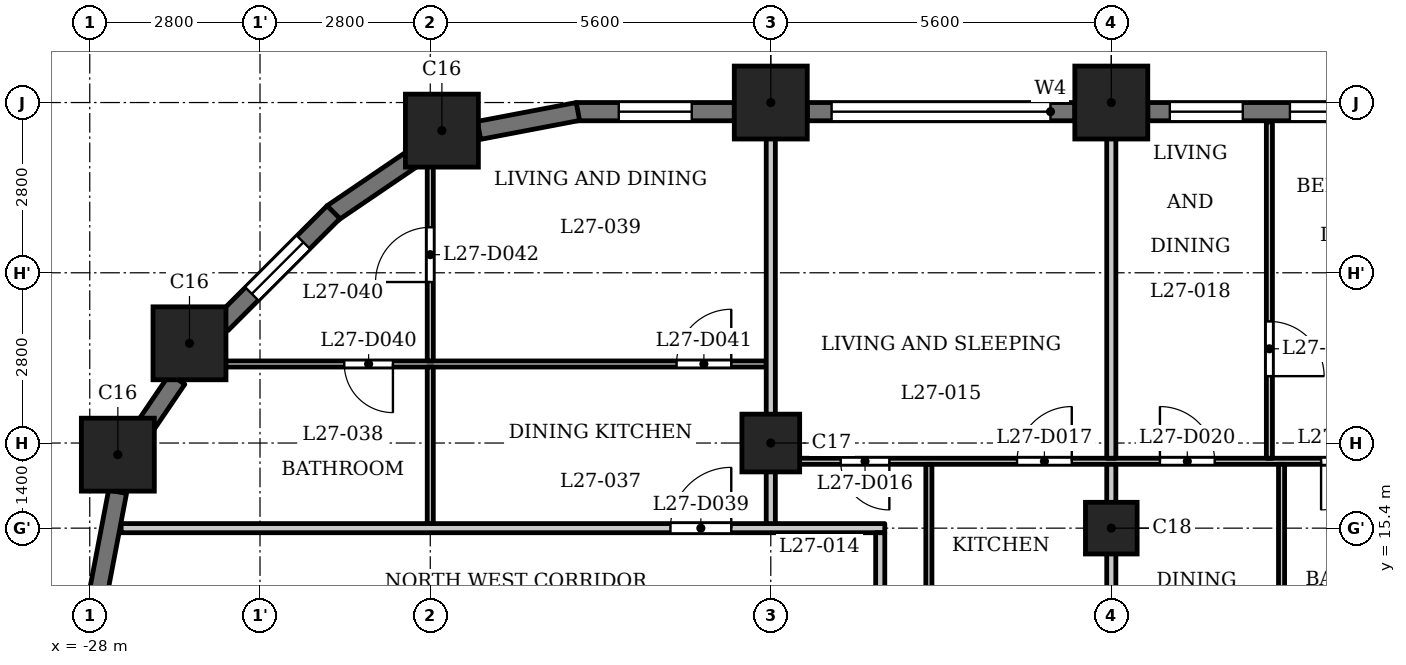
"""IFC4 building model, lengths in metres.
Left out: names, types, materials, properties, quantities, classifications, styles, units other than length and angle.
Written with IfcOpenShell. Run it as: python <this file> out.ifc"""

import sys

from ifc_helpers import new_model, si_unit, direction, frame, frame_2d, origin, origin_2d, place, context, subcontext, project, spatial, rectangle, extrude, element, fill, save


model = new_model("IFC4")
c1 = context("Model", 3, precision=1e-05, world=origin(), true_north=direction((0.0, 1.0)))
c2 = subcontext(c1, "Body", "Model", "MODEL_VIEW")
j1 = project(units=[si_unit("LENGTHUNIT", "METRE"), si_unit("PLANEANGLEUNIT", "RADIAN")], contexts=[c1])
p1 = place(None, origin())
s1 = spatial("IfcSite", under=j1, at=p1, CompositionType="ELEMENT")
p2 = place(p1, origin())
s2 = spatial("IfcBuilding", under=s1, at=p2, CompositionType="ELEMENT")
p3 = place(p2, frame((0.0, 0.0, 107.8)))
s3 = spatial("IfcBuildingStorey", under=s2, at=p3, CompositionType="ELEMENT", Elevation=107.8)
for number, where, z_axis, x_axis in (
    (1, (-11.2, 22.4, 0.0), (0.0, 0.0, 1.0), (1.0, 0.0, 0.0)),
    (2, (-16.8, 22.4, 0.0), (0.0, 0.0, 1.0), (1.0, 0.0, 0.0)),
    (3, (-22.209, 21.938, 0.0), (0.0, 0.0, 1.0), (1.0, 0.0, 0.0)),
    (4, (-26.36, 18.44, 0.0), (0.0, 0.0, 1.0), (1.0, 0.0, 0.0)),
    (5, (-27.538, 16.609, 0.0), (0.0, 0.0, 1.0), (1.0, 0.0, 0.0)),
):
    element("IfcColumn", number, at=place(p3, frame(where, z_axis=z_axis, x_axis=x_axis)), inside=s3, PredefinedType="COLUMN", context=c2, shape_type="SweptSolid", body=[
        extrude(rectangle(XDim=1.2, YDim=1.2, at=origin_2d()), origin(), (0.0, 0.0, 1.0), 3.5),
    ])
p4 = place(p3, frame((-16.8, 16.8, 0.0), z_axis=(0.0, 0.0, 1.0), x_axis=(1.0, 0.0, 0.0)))
e6 = element("IfcColumn", 6, at=p4, inside=s3, PredefinedType="COLUMN", context=c2, shape_type="SweptSolid", body=[
    extrude(rectangle(XDim=0.95, YDim=0.95, at=origin_2d()), origin(), (0.0, 0.0, 1.0), 3.5),
])
p5 = place(p3, frame((-11.2, 15.4, 0.0), z_axis=(0.0, 0.0, 1.0), x_axis=(1.0, 0.0, 0.0)))
e7 = element("IfcColumn", 7, at=p5, inside=s3, PredefinedType="COLUMN", context=c2, shape_type="SweptSolid", body=[
    extrude(rectangle(XDim=0.85, YDim=0.85, at=origin_2d()), origin(), (0.0, 0.0, 1.0), 3.5),
])
p6 = place(p3, frame((-6.2, 22.25, 0.0), z_axis=(0.0, 0.0, 1.0), x_axis=(-1.0, 0.0, 0.0)))
e8 = element("IfcWall", 8, at=p6, inside=s3, PredefinedType="SOLIDWALL", context=c2, shape_type="SweptSolid", body=[
    extrude(rectangle(XDim=4.4, YDim=0.3, at=frame_2d((2.2, 0.0))), origin(), (0.0, 0.0, 1.0), 2.4),
])
p7 = place(p6, frame((0.262, 0.0, 0.9)))
e9 = element("IfcOpeningElement", 9, at=p7, cuts=e8, PredefinedType="OPENING", context=c2, shape_type="SweptSolid", body=[
    extrude(rectangle(XDim=1.8, YDim=1.25, at=frame_2d((0.9, 0.625))), frame((0.0, 0.16, 0.0), z_axis=(0.0, -1.0, 0.0), x_axis=(1.0, 0.0, 0.0)), (0.0, 0.0, 1.0), 0.32),
])
p8 = place(p6, frame((2.837, 0.0, 0.6)))
e10 = element("IfcOpeningElement", 10, at=p8, cuts=e8, PredefinedType="OPENING", context=c2, shape_type="SweptSolid", body=[
    extrude(rectangle(XDim=1.2, YDim=1.55, at=frame_2d((0.6, 0.775))), frame((0.0, 0.16, 0.0), z_axis=(0.0, -1.0, 0.0), x_axis=(1.0, 0.0, 0.0)), (0.0, 0.0, 1.0), 0.32),
])
p9 = place(p3, frame((-11.8, 22.25, 0.0), z_axis=(0.0, 0.0, 1.0), x_axis=(-1.0, 0.0, 0.0)))
e11 = element("IfcWall", 11, at=p9, inside=s3, PredefinedType="SOLIDWALL", context=c2, shape_type="SweptSolid", body=[
    extrude(rectangle(XDim=4.4, YDim=0.3, at=frame_2d((2.2, 0.0))), origin(), (0.0, 0.0, 1.0), 2.4),
])
p10 = place(p9, frame((0.4, 0.0, 1.2)))
e12 = element("IfcOpeningElement", 12, at=p10, cuts=e11, PredefinedType="OPENING", context=c2, shape_type="SweptSolid", body=[
    extrude(rectangle(XDim=3.6, YDim=0.95, at=frame_2d((1.8, 0.475))), frame((0.0, 0.16, 0.0), z_axis=(0.0, -1.0, 0.0), x_axis=(1.0, 0.0, 0.0)), (0.0, 0.0, 1.0), 0.32),
])
p11 = place(p3, frame((-17.4, 22.25, 0.0), z_axis=(0.0, 0.0, 1.0), x_axis=(-1.0, 0.0, 0.0)))
e13 = element("IfcWall", 13, at=p11, inside=s3, PredefinedType="SOLIDWALL", context=c2, shape_type="SweptSolid", body=[
    extrude(rectangle(XDim=2.6, YDim=0.3, at=frame_2d((1.3, 0.0))), origin(), (0.0, 0.0, 1.0), 2.4),
])
p12 = place(p11, frame((0.7, 0.0, 0.6)))
e14 = element("IfcOpeningElement", 14, at=p12, cuts=e13, PredefinedType="OPENING", context=c2, shape_type="SweptSolid", body=[
    extrude(rectangle(XDim=1.2, YDim=1.55, at=frame_2d((0.6, 0.775))), frame((0.0, 0.16, 0.0), z_axis=(0.0, -1.0, 0.0), x_axis=(1.0, 0.0, 0.0)), (0.0, 0.0, 1.0), 0.32),
])
for number, where, z_axis, x_axis in (
    (15, (-19.972, 22.253, 0.0), (0.0, 0.0, 1.0), (-0.982, -0.187, 0.0)),
    (16, (-22.643, 21.51, 0.0), (0.0, 0.0, 1.0), (-0.827, -0.562, 0.0)),
):
    element("IfcWall", number, at=place(p3, frame(where, z_axis=z_axis, x_axis=x_axis)), inside=s3, PredefinedType="SOLIDWALL", context=c2, shape_type="SweptSolid", body=[
        extrude(rectangle(XDim=1.656, YDim=0.3, at=frame_2d((0.828, 0.0))), origin(), (0.0, 0.0, 1.0), 2.4),
    ])
p13 = place(p3, frame((-23.991, 20.597, 0.0), z_axis=(0.0, 0.0, 1.0), x_axis=(-0.707106781187, -0.707106781187, 0.0)))
e17 = element("IfcWall", 17, at=p13, inside=s3, PredefinedType="SOLIDWALL", context=c2, shape_type="SweptSolid", body=[
    extrude(rectangle(XDim=2.6, YDim=0.3, at=frame_2d((1.3, 0.0))), origin(), (0.0, 0.0, 1.0), 2.4),
])
p14 = place(p13, frame((0.7, 0.0, 0.6)))
e18 = element("IfcOpeningElement", 18, at=p14, cuts=e17, PredefinedType="OPENING", context=c2, shape_type="SweptSolid", body=[
    extrude(rectangle(XDim=1.2, YDim=1.55, at=frame_2d((0.6, 0.775))), frame((0.0, 0.16, 0.0), z_axis=(0.0, -1.0, 0.0), x_axis=(1.0, 0.0, 0.0)), (0.0, 0.0, 1.0), 0.32),
])
p15 = place(p3, frame((-26.561, 17.851, 0.0), z_axis=(0.0, 0.0, 1.0), x_axis=(-0.562173331661, -0.827019434577, 0.0)))
e19 = element("IfcWall", 19, at=p15, inside=s3, PredefinedType="SOLIDWALL", context=c2, shape_type="SweptSolid", body=[
    extrude(rectangle(XDim=0.977, YDim=0.3, at=frame_2d((0.489, 0.0))), origin(), (0.0, 0.0, 1.0), 3.2),
])
p16 = place(p3, frame((-27.542, 15.999, 0.0), z_axis=(0.0, 0.0, 1.0), x_axis=(-0.187349172861, -0.982293381546, 0.0)))
e20 = element("IfcWall", 20, at=p16, inside=s3, PredefinedType="SOLIDWALL", context=c2, shape_type="SweptSolid", body=[
    extrude(rectangle(XDim=1.656, YDim=0.3, at=frame_2d((0.828, 0.0))), origin(), (0.0, 0.0, 1.0), 2.4),
])
p17 = place(p3, frame((-27.484, 15.4, 0.0), z_axis=(0.0, 0.0, 1.0), x_axis=(1.0, 0.0, 0.0)))
e21 = element("IfcWall", 21, at=p17, inside=s3, PredefinedType="PARTITIONING", context=c2, shape_type="SweptSolid", body=[
    extrude(rectangle(XDim=12.559, YDim=0.15, at=frame_2d((6.279, 0.0))), origin(), (0.0, 0.0, 1.0), 3.2),
])
p18 = place(p17, frame((9.034, 0.0, 0.0)))
e22 = element("IfcOpeningElement", 22, at=p18, cuts=e21, PredefinedType="OPENING", context=c2, shape_type="SweptSolid", body=[
    extrude(rectangle(XDim=1.0, YDim=2.1, at=frame_2d((0.5, 1.05))), frame((0.0, 0.085, 0.0), z_axis=(0.0, -1.0, 0.0), x_axis=(1.0, 0.0, 0.0)), (0.0, 0.0, 1.0), 0.17),
])
p19 = place(p3, frame((-16.725, 16.5, 0.0), z_axis=(0.0, 0.0, 1.0), x_axis=(1.0, 0.0, 0.0)))
e23 = element("IfcWall", 23, at=p19, inside=s3, PredefinedType="PARTITIONING", context=c2, shape_type="SweptSolid", body=[
    extrude(rectangle(XDim=33.45, YDim=0.1, at=frame_2d((16.725, 0.0))), origin(), (0.0, 0.0, 1.0), 3.2),
])
p20 = place(p19, frame((1.075, 0.0, 0.0)))
e24 = element("IfcOpeningElement", 24, at=p20, cuts=e23, PredefinedType="OPENING", context=c2, shape_type="SweptSolid", body=[
    extrude(rectangle(XDim=0.8, YDim=2.1, at=frame_2d((0.4, 1.05))), frame((0.0, 0.06, 0.0), z_axis=(0.0, -1.0, 0.0), x_axis=(1.0, 0.0, 0.0)), (0.0, 0.0, 1.0), 0.12),
])
p21 = place(p19, frame((3.975, 0.0, 0.0)))
e25 = element("IfcOpeningElement", 25, at=p21, cuts=e23, PredefinedType="OPENING", context=c2, shape_type="SweptSolid", body=[
    extrude(rectangle(XDim=0.9, YDim=2.1, at=frame_2d((0.45, 1.05))), frame((0.0, 0.06, 0.0), z_axis=(0.0, -1.0, 0.0), x_axis=(1.0, 0.0, 0.0)), (0.0, 0.0, 1.0), 0.12),
])
p22 = place(p19, frame((8.975, 0.0, 0.0)))
e26 = element("IfcOpeningElement", 26, at=p22, cuts=e23, PredefinedType="OPENING", context=c2, shape_type="SweptSolid", body=[
    extrude(rectangle(XDim=0.8, YDim=2.1, at=frame_2d((0.4, 1.05))), frame((0.0, 0.06, 0.0), z_axis=(0.0, -1.0, 0.0), x_axis=(1.0, 0.0, 0.0)), (0.0, 0.0, 1.0), 0.12),
])
p23 = place(p19, frame((6.325, 0.0, 0.0)))
e27 = element("IfcOpeningElement", 27, at=p23, cuts=e23, PredefinedType="OPENING", context=c2, shape_type="SweptSolid", body=[
    extrude(rectangle(XDim=0.9, YDim=2.1, at=frame_2d((0.45, 1.05))), frame((0.0, 0.06, 0.0), z_axis=(0.0, -1.0, 0.0), x_axis=(1.0, 0.0, 0.0)), (0.0, 0.0, 1.0), 0.12),
])
p24 = place(p19, frame((20.725, 0.0, 0.0)))
e28 = element("IfcOpeningElement", 28, at=p24, cuts=e23, PredefinedType="OPENING", context=c2, shape_type="SweptSolid", body=[
    extrude(rectangle(XDim=0.8, YDim=2.1, at=frame_2d((0.4, 1.05))), frame((0.0, 0.06, 0.0), z_axis=(0.0, -1.0, 0.0), x_axis=(1.0, 0.0, 0.0)), (0.0, 0.0, 1.0), 0.12),
])
p25 = place(p19, frame((17.775, 0.0, 0.0)))
e29 = element("IfcOpeningElement", 29, at=p25, cuts=e23, PredefinedType="OPENING", context=c2, shape_type="SweptSolid", body=[
    extrude(rectangle(XDim=0.9, YDim=2.1, at=frame_2d((0.45, 1.05))), frame((0.0, 0.06, 0.0), z_axis=(0.0, -1.0, 0.0), x_axis=(1.0, 0.0, 0.0)), (0.0, 0.0, 1.0), 0.12),
])
p26 = place(p19, frame((11.825, 0.0, 0.0)))
e30 = element("IfcOpeningElement", 30, at=p26, cuts=e23, PredefinedType="OPENING", context=c2, shape_type="SweptSolid", body=[
    extrude(rectangle(XDim=0.9, YDim=2.1, at=frame_2d((0.45, 1.05))), frame((0.0, 0.06, 0.0), z_axis=(0.0, -1.0, 0.0), x_axis=(1.0, 0.0, 0.0)), (0.0, 0.0, 1.0), 0.12),
])
p27 = place(p19, frame((15.175, 0.0, 0.0)))
e31 = element("IfcOpeningElement", 31, at=p27, cuts=e23, PredefinedType="OPENING", context=c2, shape_type="SweptSolid", body=[
    extrude(rectangle(XDim=0.9, YDim=2.1, at=frame_2d((0.45, 1.05))), frame((0.0, 0.06, 0.0), z_axis=(0.0, -1.0, 0.0), x_axis=(1.0, 0.0, 0.0)), (0.0, 0.0, 1.0), 0.12),
])
p28 = place(p19, frame((22.975, 0.0, 0.0)))
e32 = element("IfcOpeningElement", 32, at=p28, cuts=e23, PredefinedType="OPENING", context=c2, shape_type="SweptSolid", body=[
    extrude(rectangle(XDim=0.8, YDim=2.1, at=frame_2d((0.4, 1.05))), frame((0.0, 0.06, 0.0), z_axis=(0.0, -1.0, 0.0), x_axis=(1.0, 0.0, 0.0)), (0.0, 0.0, 1.0), 0.12),
])
p29 = place(p19, frame((24.875, 0.0, 0.0)))
e33 = element("IfcOpeningElement", 33, at=p29, cuts=e23, PredefinedType="OPENING", context=c2, shape_type="SweptSolid", body=[
    extrude(rectangle(XDim=0.9, YDim=2.1, at=frame_2d((0.45, 1.05))), frame((0.0, 0.06, 0.0), z_axis=(0.0, -1.0, 0.0), x_axis=(1.0, 0.0, 0.0)), (0.0, 0.0, 1.0), 0.12),
])
p30 = place(p19, frame((32.075, 0.0, 0.0)))
e34 = element("IfcOpeningElement", 34, at=p30, cuts=e23, PredefinedType="OPENING", context=c2, shape_type="SweptSolid", body=[
    extrude(rectangle(XDim=0.8, YDim=2.1, at=frame_2d((0.4, 1.05))), frame((0.0, 0.06, 0.0), z_axis=(0.0, -1.0, 0.0), x_axis=(1.0, 0.0, 0.0)), (0.0, 0.0, 1.0), 0.12),
])
p31 = place(p19, frame((29.175, 0.0, 0.0)))
e35 = element("IfcOpeningElement", 35, at=p31, cuts=e23, PredefinedType="OPENING", context=c2, shape_type="SweptSolid", body=[
    extrude(rectangle(XDim=0.9, YDim=2.1, at=frame_2d((0.45, 1.05))), frame((0.0, 0.06, 0.0), z_axis=(0.0, -1.0, 0.0), x_axis=(1.0, 0.0, 0.0)), (0.0, 0.0, 1.0), 0.12),
])
p32 = place(p3, frame((-26.44, 18.1, 0.0), z_axis=(0.0, 0.0, 1.0), x_axis=(1.0, 0.0, 0.0)))
e36 = element("IfcWall", 36, at=p32, inside=s3, PredefinedType="PARTITIONING", context=c2, shape_type="SweptSolid", body=[
    extrude(rectangle(XDim=9.565, YDim=0.1, at=frame_2d((4.782, 0.0))), origin(), (0.0, 0.0, 1.0), 3.2),
])
p33 = place(p32, frame((2.626, 0.0, 0.0)))
e37 = element("IfcOpeningElement", 37, at=p33, cuts=e36, PredefinedType="OPENING", context=c2, shape_type="SweptSolid", body=[
    extrude(rectangle(XDim=0.8, YDim=2.1, at=frame_2d((0.4, 1.05))), frame((0.0, 0.06, 0.0), z_axis=(0.0, -1.0, 0.0), x_axis=(1.0, 0.0, 0.0)), (0.0, 0.0, 1.0), 0.12),
])
p34 = place(p32, frame((8.09, 0.0, 0.0)))
e38 = element("IfcOpeningElement", 38, at=p34, cuts=e36, PredefinedType="OPENING", context=c2, shape_type="SweptSolid", body=[
    extrude(rectangle(XDim=0.9, YDim=2.1, at=frame_2d((0.45, 1.05))), frame((0.0, 0.06, 0.0), z_axis=(0.0, -1.0, 0.0), x_axis=(1.0, 0.0, 0.0)), (0.0, 0.0, 1.0), 0.12),
])
p35 = place(p3, frame((-22.4, 15.475, 0.0), z_axis=(0.0, 0.0, 1.0), x_axis=(0.0, 1.0, 0.0)))
e39 = element("IfcWall", 39, at=p35, inside=s3, PredefinedType="PARTITIONING", context=c2, shape_type="SweptSolid", body=[
    extrude(rectangle(XDim=2.575, YDim=0.1, at=frame_2d((1.288, 0.0))), origin(), (0.0, 0.0, 1.0), 3.2),
])
p36 = place(p3, frame((-22.4, 18.15, 0.0), z_axis=(0.0, 0.0, 1.0), x_axis=(0.0, 1.0, 0.0)))
e40 = element("IfcWall", 40, at=p36, inside=s3, PredefinedType="PARTITIONING", context=c2, shape_type="SweptSolid", body=[
    extrude(rectangle(XDim=3.57, YDim=0.1, at=frame_2d((1.785, 0.0))), origin(), (0.0, 0.0, 1.0), 3.2),
])
p37 = place(p36, frame((1.298, 0.0, 0.0)))
e41 = element("IfcOpeningElement", 41, at=p37, cuts=e40, PredefinedType="OPENING", context=c2, shape_type="SweptSolid", body=[
    extrude(rectangle(XDim=0.9, YDim=2.1, at=frame_2d((0.45, 1.05))), frame((0.0, 0.06, 0.0), z_axis=(0.0, -1.0, 0.0), x_axis=(1.0, 0.0, 0.0)), (0.0, 0.0, 1.0), 0.12),
])
p38 = place(p3, frame((-16.8, 15.475, 0.0), z_axis=(0.0, 0.0, 1.0), x_axis=(0.0, 1.0, 0.0)))
e42 = element("IfcWall", 42, at=p38, inside=s3, PredefinedType="PARTITIONING", context=c2, shape_type="SweptSolid", body=[
    extrude(rectangle(XDim=7.505, YDim=0.15, at=frame_2d((3.752, 0.0))), origin(), (0.0, 0.0, 1.0), 3.2),
])
p39 = place(p3, frame((-15.0, 13.275, 0.0), z_axis=(0.0, 0.0, 1.0), x_axis=(0.0, 1.0, 0.0)))
e43 = element("IfcWall", 43, at=p39, inside=s3, PredefinedType="PARTITIONING", context=c2, shape_type="SweptSolid", body=[
    extrude(rectangle(XDim=2.05, YDim=0.15, at=frame_2d((1.025, 0.0))), origin(), (0.0, 0.0, 1.0), 3.2),
])
p40 = place(p3, frame((-14.2, 13.275, 0.0), z_axis=(0.0, 0.0, 1.0), x_axis=(0.0, 1.0, 0.0)))
e44 = element("IfcWall", 44, at=p40, inside=s3, PredefinedType="PARTITIONING", context=c2, shape_type="SweptSolid", body=[
    extrude(rectangle(XDim=3.175, YDim=0.1, at=frame_2d((1.587, 0.0))), origin(), (0.0, 0.0, 1.0), 3.2),
])
p41 = place(p3, frame((-11.2, 13.275, 0.0), z_axis=(0.0, 0.0, 1.0), x_axis=(0.0, 1.0, 0.0)))
e45 = element("IfcWall", 45, at=p41, inside=s3, PredefinedType="PARTITIONING", context=c2, shape_type="SweptSolid", body=[
    extrude(rectangle(XDim=3.175, YDim=0.15, at=frame_2d((1.587, 0.0))), origin(), (0.0, 0.0, 1.0), 3.2),
])
p42 = place(p3, frame((-11.2, 16.55, 0.0), z_axis=(0.0, 0.0, 1.0), x_axis=(0.0, 1.0, 0.0)))
e46 = element("IfcWall", 46, at=p42, inside=s3, PredefinedType="PARTITIONING", context=c2, shape_type="SweptSolid", body=[
    extrude(rectangle(XDim=6.43, YDim=0.15, at=frame_2d((3.215, 0.0))), origin(), (0.0, 0.0, 1.0), 3.2),
])
p43 = place(p3, frame((-8.6, 16.55, 0.0), z_axis=(0.0, 0.0, 1.0), x_axis=(0.0, 1.0, 0.0)))
e47 = element("IfcWall", 47, at=p43, inside=s3, PredefinedType="PARTITIONING", context=c2, shape_type="SweptSolid", body=[
    extrude(rectangle(XDim=5.53, YDim=0.1, at=frame_2d((2.765, 0.0))), origin(), (0.0, 0.0, 1.0), 3.2),
])
p44 = place(p43, frame((1.35, 0.0, 0.0)))
e48 = element("IfcOpeningElement", 48, at=p44, cuts=e47, PredefinedType="OPENING", context=c2, shape_type="SweptSolid", body=[
    extrude(rectangle(XDim=0.9, YDim=2.1, at=frame_2d((0.45, 1.05))), frame((0.0, 0.06, 0.0), z_axis=(0.0, -1.0, 0.0), x_axis=(1.0, 0.0, 0.0)), (0.0, 0.0, 1.0), 0.12),
])
p45 = place(p3, frame((-8.4, 13.275, 0.0), z_axis=(0.0, 0.0, 1.0), x_axis=(0.0, 1.0, 0.0)))
e49 = element("IfcWall", 49, at=p45, inside=s3, PredefinedType="PARTITIONING", context=c2, shape_type="SweptSolid", body=[
    extrude(rectangle(XDim=3.175, YDim=0.1, at=frame_2d((1.587, 0.0))), origin(), (0.0, 0.0, 1.0), 3.2),
])
p46 = place(p20, origin())
e50 = element("IfcDoor", 50, at=p46, inside=s3, OperationType="SINGLE_SWING_RIGHT", PredefinedType="DOOR", context=c2, shape_type="SweptSolid", body=[
    extrude(rectangle(XDim=0.8, YDim=2.1, at=frame_2d((0.4, 1.05))), frame((0.0, 0.025, 0.0), z_axis=(0.0, -1.0, 0.0), x_axis=(1.0, 0.0, 0.0)), (0.0, 0.0, 1.0), 0.05),
])
fill(e24, e50)
p47 = place(p21, origin())
e51 = element("IfcDoor", 51, at=p47, inside=s3, OperationType="SINGLE_SWING_LEFT", PredefinedType="DOOR", context=c2, shape_type="SweptSolid", body=[
    extrude(rectangle(XDim=0.9, YDim=2.1, at=frame_2d((0.45, 1.05))), frame((0.0, 0.025, 0.0), z_axis=(0.0, -1.0, 0.0), x_axis=(1.0, 0.0, 0.0)), (0.0, 0.0, 1.0), 0.05),
])
fill(e25, e51)
p48 = place(p22, origin())
e52 = element("IfcDoor", 52, at=p48, inside=s3, OperationType="SINGLE_SWING_LEFT", PredefinedType="DOOR", context=c2, shape_type="SweptSolid", body=[
    extrude(rectangle(XDim=0.8, YDim=2.1, at=frame_2d((0.4, 1.05))), frame((0.0, 0.025, 0.0), z_axis=(0.0, -1.0, 0.0), x_axis=(1.0, 0.0, 0.0)), (0.0, 0.0, 1.0), 0.05),
])
fill(e26, e52)
p49 = place(p23, origin())
e53 = element("IfcDoor", 53, at=p49, inside=s3, OperationType="SINGLE_SWING_RIGHT", PredefinedType="DOOR", context=c2, shape_type="SweptSolid", body=[
    extrude(rectangle(XDim=0.9, YDim=2.1, at=frame_2d((0.45, 1.05))), frame((0.0, 0.025, 0.0), z_axis=(0.0, -1.0, 0.0), x_axis=(1.0, 0.0, 0.0)), (0.0, 0.0, 1.0), 0.05),
])
fill(e27, e53)
p50 = place(p44, origin())
e54 = element("IfcDoor", 54, at=p50, inside=s3, OperationType="SINGLE_SWING_LEFT", PredefinedType="DOOR", context=c2, shape_type="SweptSolid", body=[
    extrude(rectangle(XDim=0.9, YDim=2.1, at=frame_2d((0.45, 1.05))), frame((0.0, 0.025, 0.0), z_axis=(0.0, -1.0, 0.0), x_axis=(1.0, 0.0, 0.0)), (0.0, 0.0, 1.0), 0.05),
])
fill(e48, e54)
p51 = place(p18, origin())
e55 = element("IfcDoor", 55, at=p51, inside=s3, OperationType="SINGLE_SWING_LEFT", PredefinedType="DOOR", context=c2, shape_type="SweptSolid", body=[
    extrude(rectangle(XDim=1.0, YDim=2.1, at=frame_2d((0.5, 1.05))), frame((0.0, 0.025, 0.0), z_axis=(0.0, -1.0, 0.0), x_axis=(1.0, 0.0, 0.0)), (0.0, 0.0, 1.0), 0.05),
])
fill(e22, e55)
p52 = place(p33, origin())
e56 = element("IfcDoor", 56, at=p52, inside=s3, OperationType="SINGLE_SWING_RIGHT", PredefinedType="DOOR", context=c2, shape_type="SweptSolid", body=[
    extrude(rectangle(XDim=0.8, YDim=2.1, at=frame_2d((0.4, 1.05))), frame((0.0, 0.025, 0.0), z_axis=(0.0, -1.0, 0.0), x_axis=(1.0, 0.0, 0.0)), (0.0, 0.0, 1.0), 0.05),
])
fill(e37, e56)
p53 = place(p34, origin())
e57 = element("IfcDoor", 57, at=p53, inside=s3, OperationType="SINGLE_SWING_LEFT", PredefinedType="DOOR", context=c2, shape_type="SweptSolid", body=[
    extrude(rectangle(XDim=0.9, YDim=2.1, at=frame_2d((0.45, 1.05))), frame((0.0, 0.025, 0.0), z_axis=(0.0, -1.0, 0.0), x_axis=(1.0, 0.0, 0.0)), (0.0, 0.0, 1.0), 0.05),
])
fill(e38, e57)
p54 = place(p37, origin())
e58 = element("IfcDoor", 58, at=p54, inside=s3, OperationType="SINGLE_SWING_RIGHT", PredefinedType="DOOR", context=c2, shape_type="SweptSolid", body=[
    extrude(rectangle(XDim=0.9, YDim=2.1, at=frame_2d((0.45, 1.05))), frame((0.0, 0.025, 0.0), z_axis=(0.0, -1.0, 0.0), x_axis=(1.0, 0.0, 0.0)), (0.0, 0.0, 1.0), 0.05),
])
fill(e41, e58)
p55 = place(p7, origin())
e59 = element("IfcWindow", 59, at=p55, inside=s3, PartitioningType="SINGLE_PANEL", PredefinedType="WINDOW", context=c2, shape_type="SweptSolid", body=[
    extrude(rectangle(XDim=1.8, YDim=1.25, at=frame_2d((0.9, 0.625))), frame((0.0, 0.03, 0.0), z_axis=(0.0, -1.0, 0.0), x_axis=(1.0, 0.0, 0.0)), (0.0, 0.0, 1.0), 0.06),
])
fill(e9, e59)
p56 = place(p8, origin())
e60 = element("IfcWindow", 60, at=p56, inside=s3, PartitioningType="SINGLE_PANEL", PredefinedType="WINDOW", context=c2, shape_type="SweptSolid", body=[
    extrude(rectangle(XDim=1.2, YDim=1.55, at=frame_2d((0.6, 0.775))), frame((0.0, 0.03, 0.0), z_axis=(0.0, -1.0, 0.0), x_axis=(1.0, 0.0, 0.0)), (0.0, 0.0, 1.0), 0.06),
])
fill(e10, e60)
p57 = place(p10, origin())
e61 = element("IfcWindow", 61, at=p57, inside=s3, PartitioningType="SINGLE_PANEL", PredefinedType="WINDOW", context=c2, shape_type="SweptSolid", body=[
    extrude(rectangle(XDim=3.6, YDim=0.95, at=frame_2d((1.8, 0.475))), frame((0.0, 0.03, 0.0), z_axis=(0.0, -1.0, 0.0), x_axis=(1.0, 0.0, 0.0)), (0.0, 0.0, 1.0), 0.06),
])
fill(e12, e61)
p58 = place(p12, origin())
e62 = element("IfcWindow", 62, at=p58, inside=s3, PartitioningType="SINGLE_PANEL", PredefinedType="WINDOW", context=c2, shape_type="SweptSolid", body=[
    extrude(rectangle(XDim=1.2, YDim=1.55, at=frame_2d((0.6, 0.775))), frame((0.0, 0.03, 0.0), z_axis=(0.0, -1.0, 0.0), x_axis=(1.0, 0.0, 0.0)), (0.0, 0.0, 1.0), 0.06),
])
fill(e14, e62)
p59 = place(p14, origin())
e63 = element("IfcWindow", 63, at=p59, inside=s3, PartitioningType="SINGLE_PANEL", PredefinedType="WINDOW", context=c2, shape_type="SweptSolid", body=[
    extrude(rectangle(XDim=1.2, YDim=1.55, at=frame_2d((0.6, 0.775))), frame((0.0, 0.03, 0.0), z_axis=(0.0, -1.0, 0.0), x_axis=(1.0, 0.0, 0.0)), (0.0, 0.0, 1.0), 0.06),
])
fill(e18, e63)
save(model, sys.argv[1])
